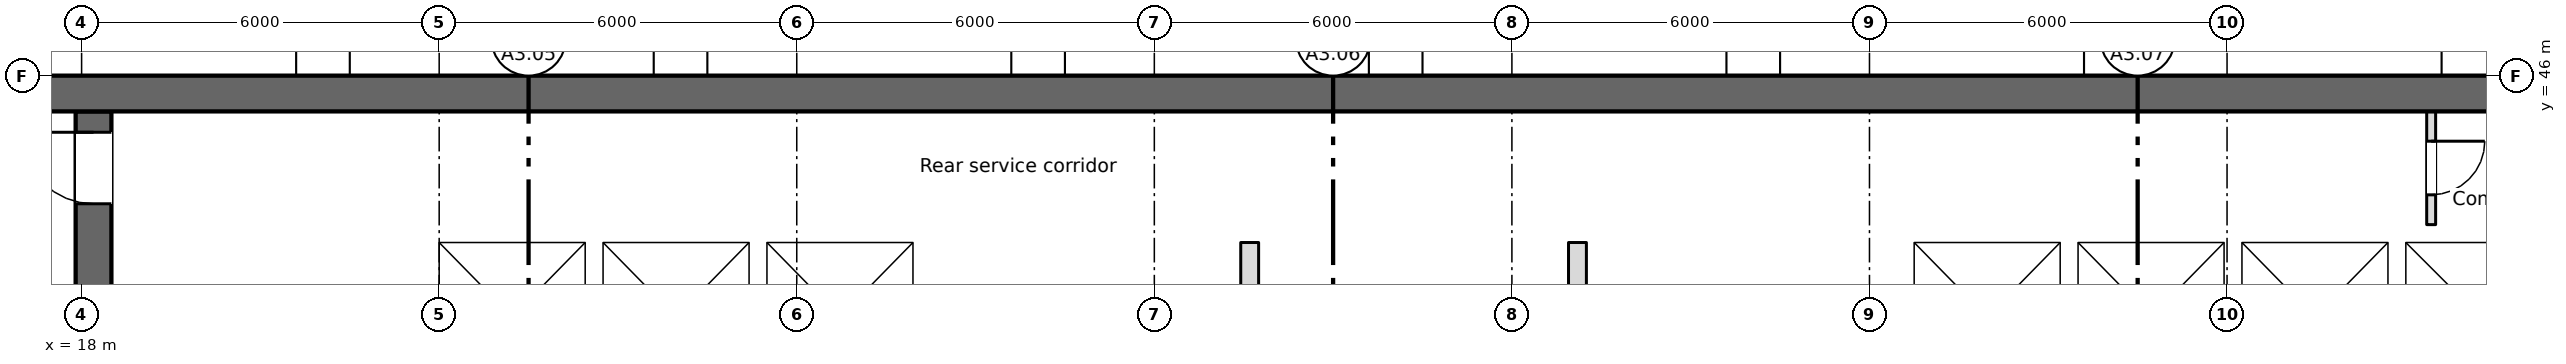
"""IFC4 building model, lengths in metres.
Left out: names, types, materials, properties, quantities, classifications, styles, units other than length and angle.
Written with IfcOpenShell. Run it as: python <this file> out.ifc"""

import sys

from ifc_helpers import new_model, si_unit, direction, frame, frame_2d, origin, place, context, subcontext, project, spatial, rectangle, extrude, element, fill, save


model = new_model("IFC4")
c1 = context("Model", 3, precision=1e-05, world=origin(), true_north=direction((0.0, 1.0)))
c2 = subcontext(c1, "Body", "Model", "MODEL_VIEW")
j1 = project(units=[si_unit("LENGTHUNIT", "METRE"), si_unit("PLANEANGLEUNIT", "RADIAN")], contexts=[c1])
p1 = place(None, origin())
s1 = spatial("IfcSite", under=j1, at=p1, CompositionType="ELEMENT")
p2 = place(p1, origin())
s2 = spatial("IfcBuilding", under=s1, at=p2, CompositionType="ELEMENT")
p3 = place(p2, frame((0.0, 0.0, 231.75)))
s3 = spatial("IfcBuildingStorey", under=s2, at=p3, CompositionType="ELEMENT", Elevation=231.75)
p4 = place(p3, frame((11.55, 45.7, 0.0), z_axis=(0.0, 0.0, 1.0), x_axis=(1.0, 0.0, 0.0)))
e1 = element("IfcWall", 1, at=p4, inside=s3, PredefinedType="SHEAR", context=c2, shape_type="SweptSolid", body=[
    extrude(rectangle(XDim=48.9, YDim=0.6, at=frame_2d((24.45, 0.0))), origin(), (0.0, 0.0, 1.0), 3.4),
])
p5 = place(p4, frame((1.2, 0.0, 0.6)))
e2 = element("IfcOpeningElement", 2, at=p5, cuts=e1, PredefinedType="OPENING", context=c2, shape_type="SweptSolid", body=[
    extrude(rectangle(XDim=0.6, YDim=2.4, at=frame_2d((0.3, 1.2))), frame((0.0, 0.31, 0.0), z_axis=(0.0, -1.0, 0.0), x_axis=(1.0, 0.0, 0.0)), (0.0, 0.0, 1.0), 0.62),
])
p6 = place(p3, frame((18.2, 28.4, 0.0), z_axis=(0.0, 0.0, 1.0), x_axis=(0.0, 1.0, 0.0)))
e3 = element("IfcWall", 3, at=p6, inside=s3, PredefinedType="SHEAR", context=c2, shape_type="SweptSolid", body=[
    extrude(rectangle(XDim=17.0, YDim=0.6, at=frame_2d((8.5, 0.0))), origin(), (0.0, 0.0, 1.0), 3.4),
])
p7 = place(p6, frame((9.6, 0.0, 0.0)))
e4 = element("IfcOpeningElement", 4, at=p7, cuts=e3, PredefinedType="OPENING", context=c2, shape_type="SweptSolid", body=[
    extrude(rectangle(XDim=2.0, YDim=2.1, at=frame_2d((1.0, 1.05))), frame((0.0, 0.31, 0.0), z_axis=(0.0, -1.0, 0.0), x_axis=(1.0, 0.0, 0.0)), (0.0, 0.0, 1.0), 0.62),
])
p8 = place(p6, frame((15.45, 0.0, 0.0)))
e5 = element("IfcOpeningElement", 5, at=p8, cuts=e3, PredefinedType="OPENING", context=c2, shape_type="SweptSolid", body=[
    extrude(rectangle(XDim=1.2, YDim=2.1, at=frame_2d((0.6, 1.05))), frame((0.0, 0.31, 0.0), z_axis=(0.0, -1.0, 0.0), x_axis=(1.0, 0.0, 0.0)), (0.0, 0.0, 1.0), 0.62),
])
p9 = place(p3, frame((18.5, 43.35, 0.0), z_axis=(0.0, 0.0, 1.0), x_axis=(1.0, 0.0, 0.0)))
e6 = element("IfcWall", 6, at=p9, inside=s3, PredefinedType="SHEAR", context=c2, shape_type="SweptSolid", body=[
    extrude(rectangle(XDim=41.0, YDim=0.3, at=frame_2d((20.5, 0.0))), origin(), (0.0, 0.0, 1.0), 3.4),
])
for number, where, z_axis, x_axis in (
    (7, (23.85, 40.7, 0.0), (0.0, 0.0, 1.0), (0.0, 1.0, 0.0)),
    (8, (26.6, 40.7, 0.0), (0.0, 0.0, 1.0), (0.0, 1.0, 0.0)),
    (9, (29.35, 40.7, 0.0), (0.0, 0.0, 1.0), (0.0, 1.0, 0.0)),
    (10, (32.1, 40.7, 0.0), (0.0, 0.0, 1.0), (0.0, 1.0, 0.0)),
    (11, (48.6, 40.7, 0.0), (0.0, 0.0, 1.0), (0.0, 1.0, 0.0)),
    (12, (51.35, 40.7, 0.0), (0.0, 0.0, 1.0), (0.0, 1.0, 0.0)),
    (13, (54.1, 40.7, 0.0), (0.0, 0.0, 1.0), (0.0, 1.0, 0.0)),
    (14, (56.85, 40.7, 0.0), (0.0, 0.0, 1.0), (0.0, 1.0, 0.0)),
):
    element("IfcWall", number, at=place(p3, frame(where, z_axis=z_axis, x_axis=x_axis)), inside=s3, PredefinedType="SHEAR", context=c2, shape_type="SweptSolid", body=[
        extrude(rectangle(XDim=2.5, YDim=0.3, at=frame_2d((1.25, 0.0))), origin(), (0.0, 0.0, 1.0), 3.4),
    ])
p10 = place(p3, frame((57.425, 45.4, 0.0), z_axis=(0.0, 0.0, 1.0), x_axis=(0.0, -1.0, 0.0)))
e15 = element("IfcWall", 15, at=p10, inside=s3, PredefinedType="PARTITIONING", context=c2, shape_type="SweptSolid", body=[
    extrude(rectangle(XDim=1.9, YDim=0.15, at=frame_2d((0.95, 0.0))), origin(), (0.0, 0.0, 1.0), 3.4),
])
p11 = place(p10, frame((0.5, 0.0, 0.0)))
e16 = element("IfcOpeningElement", 16, at=p11, cuts=e15, PredefinedType="OPENING", context=c2, shape_type="SweptSolid", body=[
    extrude(rectangle(XDim=0.9, YDim=2.1, at=frame_2d((0.45, 1.05))), frame((0.0, 0.085, 0.0), z_axis=(0.0, -1.0, 0.0), x_axis=(1.0, 0.0, 0.0)), (0.0, 0.0, 1.0), 0.17),
])
for number, where, z_axis, x_axis in (
    (17, (37.6, 40.7, 0.0), (0.0, 0.0, 1.0), (0.0, 1.0, 0.0)),
    (18, (43.1, 40.7, 0.0), (0.0, 0.0, 1.0), (0.0, 1.0, 0.0)),
):
    element("IfcWall", number, at=place(p3, frame(where, z_axis=z_axis, x_axis=x_axis)), inside=s3, PredefinedType="PARTITIONING", context=c2, shape_type="SweptSolid", body=[
        extrude(rectangle(XDim=2.5, YDim=0.3, at=frame_2d((1.25, 0.0))), origin(), (0.0, 0.0, 1.0), 3.4),
    ])
p12 = place(p11, origin())
e19 = element("IfcDoor", 19, at=p12, inside=s3, OperationType="SINGLE_SWING_LEFT", PredefinedType="DOOR", context=c2, shape_type="SweptSolid", body=[
    extrude(rectangle(XDim=0.9, YDim=2.1, at=frame_2d((0.45, 1.05))), frame((0.0, 0.025, 0.0), z_axis=(0.0, -1.0, 0.0), x_axis=(1.0, 0.0, 0.0)), (0.0, 0.0, 1.0), 0.05),
])
fill(e16, e19)
p13 = place(p8, origin())
e20 = element("IfcDoor", 20, at=p13, inside=s3, OperationType="SINGLE_SWING_RIGHT", PredefinedType="DOOR", context=c2, shape_type="SweptSolid", body=[
    extrude(rectangle(XDim=1.2, YDim=2.1, at=frame_2d((0.6, 1.05))), frame((0.0, 0.025, 0.0), z_axis=(0.0, -1.0, 0.0), x_axis=(1.0, 0.0, 0.0)), (0.0, 0.0, 1.0), 0.05),
])
fill(e5, e20)
save(model, sys.argv[1])
